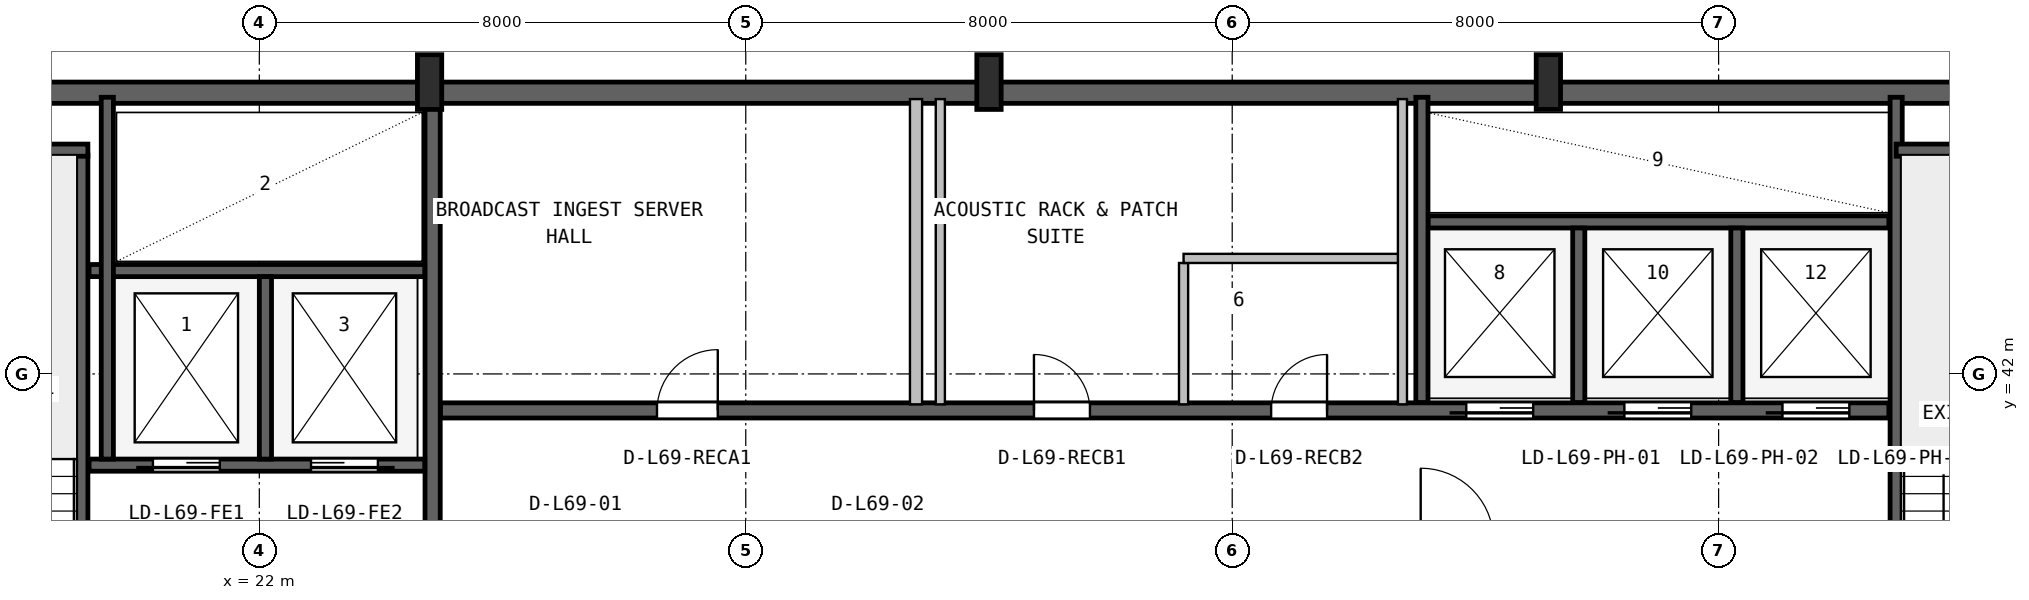
"""IFC4 building model, lengths in metres.
Left out: names, types, materials, properties, quantities, classifications, styles, units other than length and angle.
Written with IfcOpenShell. Run it as: python <this file> out.ifc"""

import sys

from ifc_helpers import new_model, si_unit, direction, frame, frame_2d, origin, origin_2d, place, context, subcontext, project, spatial, rectangle, i_section, extrude, source, transform, mapped, element, fill, save


model = new_model("IFC4")
c1 = context("Model", 3, precision=1e-05, world=origin(), true_north=direction((0.0, 1.0)))
c2 = subcontext(c1, "Body", "Model", "MODEL_VIEW")
j1 = project(units=[si_unit("LENGTHUNIT", "METRE"), si_unit("PLANEANGLEUNIT", "RADIAN")], contexts=[c1])
p1 = place(None, origin())
s1 = spatial("IfcSite", under=j1, at=p1, CompositionType="ELEMENT")
p2 = place(p1, origin())
s2 = spatial("IfcBuilding", under=s1, at=p2, CompositionType="ELEMENT")
p3 = place(p2, frame((0.0, 0.0, 277.4)))
s3 = spatial("IfcBuildingStorey", under=s2, at=p3, CompositionType="ELEMENT", Elevation=277.4)
p4 = place(p3, frame((15.325, 46.625, 0.0), z_axis=(0.0, 0.0, 1.0), x_axis=(1.0, 0.0, 0.0)))
e1 = element("IfcWall", 1, at=p4, inside=s3, PredefinedType="SHEAR", context=c2, shape_type="SweptSolid", body=[
    extrude(rectangle(XDim=37.35, YDim=0.35, at=frame_2d((18.675, 0.0))), origin(), (0.0, 0.0, 1.0), 3.55),
])
m1 = source(origin(), c2, "Body", "SweptSolid", [
    extrude(i_section(OverallWidth=0.4, OverallDepth=0.9, WebThickness=0.016, FlangeThickness=0.028, FilletRadius=0.016, at=origin_2d()), origin(), (0.0, 0.0, 1.0), 3.8),
])
for number, where, z_axis, x_axis in (
    (2, (24.8, 46.8, 0.0), (0.0, 0.0, 1.0), (1.0, 0.0, 0.0)),
    (3, (34.0, 46.8, 0.0), (0.0, 0.0, 1.0), (1.0, 0.0, 0.0)),
    (4, (43.2, 46.8, 0.0), (0.0, 0.0, 1.0), (1.0, 0.0, 0.0)),
):
    element("IfcColumn", number, at=place(p3, frame(where, z_axis=z_axis, x_axis=x_axis)), inside=s3, PredefinedType="COLUMN", context=c2, shape_type="MappedRepresentation", body=[
        mapped(m1, transform((0.0, 0.0, 0.0), x_axis=(1.0, 0.0, 0.0), y_axis=(0.0, 1.0, 0.0), z_axis=(0.0, 0.0, 1.0), scale=1.0)),
    ])
p5 = place(p3, frame((19.08, 35.95, 0.0), z_axis=(0.0, 0.0, 1.0), x_axis=(0.0, 1.0, 0.0)))
e5 = element("IfcWall", 5, at=p5, inside=s3, PredefinedType="SHEAR", context=c2, shape_type="SweptSolid", body=[
    extrude(rectangle(XDim=9.65, YDim=0.2, at=frame_2d((4.825, 0.0))), origin(), (0.0, 0.0, 1.0), 3.55),
])
p6 = place(p5, frame((0.25, 0.0, 0.0)))
e6 = element("IfcOpeningElement", 6, at=p6, cuts=e5, PredefinedType="OPENING", context=c2, shape_type="SweptSolid", body=[
    extrude(rectangle(XDim=0.95, YDim=2.1, at=frame_2d((0.475, 1.05))), frame((0.0, 0.11, 0.0), z_axis=(0.0, -1.0, 0.0), x_axis=(1.0, 0.0, 0.0)), (0.0, 0.0, 1.0), 0.22),
])
p7 = place(p3, frame((15.95, 45.68, 0.0), z_axis=(0.0, 0.0, 1.0), x_axis=(1.0, 0.0, 0.0)))
e7 = element("IfcWall", 7, at=p7, inside=s3, PredefinedType="SHEAR", context=c2, shape_type="SweptSolid", body=[
    extrude(rectangle(XDim=3.23, YDim=0.2, at=frame_2d((1.615, 0.0))), origin(), (0.0, 0.0, 1.0), 3.55),
])
p8 = place(p3, frame((24.85, 36.05, 0.0), z_axis=(0.0, 0.0, 1.0), x_axis=(0.0, 1.0, 0.0)))
e8 = element("IfcWall", 8, at=p8, inside=s3, PredefinedType="SHEAR", context=c2, shape_type="SweptSolid", body=[
    extrude(rectangle(XDim=10.45, YDim=0.25, at=frame_2d((5.225, 0.0))), origin(), (0.0, 0.0, 1.0), 3.55),
])
p9 = place(p3, frame((19.2, 40.5, 0.0), z_axis=(0.0, 0.0, 1.0), x_axis=(1.0, 0.0, 0.0)))
e9 = element("IfcWall", 9, at=p9, inside=s3, PredefinedType="SHEAR", context=c2, shape_type="SweptSolid", body=[
    extrude(rectangle(XDim=5.52, YDim=0.2, at=frame_2d((2.76, 0.0))), origin(), (0.0, 0.0, 1.0), 3.55),
])
p10 = place(p9, frame((1.05, 0.0, 0.0)))
e10 = element("IfcOpeningElement", 10, at=p10, cuts=e9, PredefinedType="OPENING", context=c2, shape_type="SweptSolid", body=[
    extrude(rectangle(XDim=1.1, YDim=2.18, at=frame_2d((0.55, 1.09))), frame((0.0, 0.11, 0.0), z_axis=(0.0, -1.0, 0.0), x_axis=(1.0, 0.0, 0.0)), (0.0, 0.0, 1.0), 0.22),
])
p11 = place(p9, frame((3.65, 0.0, 0.0)))
e11 = element("IfcOpeningElement", 11, at=p11, cuts=e9, PredefinedType="OPENING", context=c2, shape_type="SweptSolid", body=[
    extrude(rectangle(XDim=1.1, YDim=2.18, at=frame_2d((0.55, 1.09))), frame((0.0, 0.11, 0.0), z_axis=(0.0, -1.0, 0.0), x_axis=(1.0, 0.0, 0.0)), (0.0, 0.0, 1.0), 0.22),
])
p12 = place(p3, frame((19.2, 43.7, 0.0), z_axis=(0.0, 0.0, 1.0), x_axis=(1.0, 0.0, 0.0)))
e12 = element("IfcWall", 12, at=p12, inside=s3, PredefinedType="SHEAR", context=c2, shape_type="SweptSolid", body=[
    extrude(rectangle(XDim=5.52, YDim=0.2, at=frame_2d((2.76, 0.0))), origin(), (0.0, 0.0, 1.0), 3.55),
])
p13 = place(p3, frame((22.1, 40.6, 0.0), z_axis=(0.0, 0.0, 1.0), x_axis=(0.0, 1.0, 0.0)))
e13 = element("IfcWall", 13, at=p13, inside=s3, PredefinedType="SHEAR", context=c2, shape_type="SweptSolid", body=[
    extrude(rectangle(XDim=3.0, YDim=0.2, at=frame_2d((1.5, 0.0))), origin(), (0.0, 0.0, 1.0), 3.55),
])
p14 = place(p3, frame((19.5, 40.6, 0.0), z_axis=(0.0, 0.0, 1.0), x_axis=(0.0, 1.0, 0.0)))
e14 = element("IfcWall", 14, at=p14, inside=s3, PredefinedType="SHEAR", context=c2, shape_type="SweptSolid", body=[
    extrude(rectangle(XDim=5.95, YDim=0.2, at=frame_2d((2.975, 0.0))), origin(), (0.0, 0.0, 1.0), 3.55),
])
p15 = place(p3, frame((48.92, 36.05, 0.0), z_axis=(0.0, 0.0, 1.0), x_axis=(0.0, 1.0, 0.0)))
e15 = element("IfcWall", 15, at=p15, inside=s3, PredefinedType="SHEAR", context=c2, shape_type="SweptSolid", body=[
    extrude(rectangle(XDim=10.5, YDim=0.2, at=frame_2d((5.25, 0.0))), origin(), (0.0, 0.0, 1.0), 3.55),
])
p16 = place(p3, frame((48.92, 45.68, 0.0), z_axis=(0.0, 0.0, 1.0), x_axis=(1.0, 0.0, 0.0)))
e16 = element("IfcWall", 16, at=p16, inside=s3, PredefinedType="SHEAR", context=c2, shape_type="SweptSolid", body=[
    extrude(rectangle(XDim=3.18, YDim=0.2, at=frame_2d((1.59, 0.0))), origin(), (0.0, 0.0, 1.0), 3.55),
])
p17 = place(p3, frame((24.98, 41.4, 0.0), z_axis=(0.0, 0.0, 1.0), x_axis=(1.0, 0.0, 0.0)))
e17 = element("IfcWall", 17, at=p17, inside=s3, PredefinedType="SHEAR", context=c2, shape_type="SweptSolid", body=[
    extrude(rectangle(XDim=23.82, YDim=0.25, at=frame_2d((11.91, 0.0))), origin(), (0.0, 0.0, 1.0), 3.55),
])
p18 = place(p17, frame((16.87, 0.0, 0.0)))
e18 = element("IfcOpeningElement", 18, at=p18, cuts=e17, PredefinedType="OPENING", context=c2, shape_type="SweptSolid", body=[
    extrude(rectangle(XDim=1.1, YDim=2.18, at=frame_2d((0.55, 1.09))), frame((0.0, 0.135, 0.0), z_axis=(0.0, -1.0, 0.0), x_axis=(1.0, 0.0, 0.0)), (0.0, 0.0, 1.0), 0.27),
])
p19 = place(p17, frame((19.47, 0.0, 0.0)))
e19 = element("IfcOpeningElement", 19, at=p19, cuts=e17, PredefinedType="OPENING", context=c2, shape_type="SweptSolid", body=[
    extrude(rectangle(XDim=1.1, YDim=2.18, at=frame_2d((0.55, 1.09))), frame((0.0, 0.135, 0.0), z_axis=(0.0, -1.0, 0.0), x_axis=(1.0, 0.0, 0.0)), (0.0, 0.0, 1.0), 0.27),
])
p20 = place(p17, frame((22.07, 0.0, 0.0)))
e20 = element("IfcOpeningElement", 20, at=p20, cuts=e17, PredefinedType="OPENING", context=c2, shape_type="SweptSolid", body=[
    extrude(rectangle(XDim=1.1, YDim=2.18, at=frame_2d((0.55, 1.09))), frame((0.0, 0.135, 0.0), z_axis=(0.0, -1.0, 0.0), x_axis=(1.0, 0.0, 0.0)), (0.0, 0.0, 1.0), 0.27),
])
p21 = place(p17, frame((3.56, 0.0, 0.0)))
e21 = element("IfcOpeningElement", 21, at=p21, cuts=e17, PredefinedType="OPENING", context=c2, shape_type="SweptSolid", body=[
    extrude(rectangle(XDim=1.0, YDim=2.08, at=frame_2d((0.5, 1.04))), frame((0.0, 0.135, 0.0), z_axis=(0.0, -1.0, 0.0), x_axis=(1.0, 0.0, 0.0)), (0.0, 0.0, 1.0), 0.27),
])
p22 = place(p17, frame((9.76, 0.0, 0.0)))
e22 = element("IfcOpeningElement", 22, at=p22, cuts=e17, PredefinedType="OPENING", context=c2, shape_type="SweptSolid", body=[
    extrude(rectangle(XDim=0.92, YDim=2.08, at=frame_2d((0.46, 1.04))), frame((0.0, 0.135, 0.0), z_axis=(0.0, -1.0, 0.0), x_axis=(1.0, 0.0, 0.0)), (0.0, 0.0, 1.0), 0.27),
])
p23 = place(p17, frame((13.66, 0.0, 0.0)))
e23 = element("IfcOpeningElement", 23, at=p23, cuts=e17, PredefinedType="OPENING", context=c2, shape_type="SweptSolid", body=[
    extrude(rectangle(XDim=0.92, YDim=2.08, at=frame_2d((0.46, 1.04))), frame((0.0, 0.135, 0.0), z_axis=(0.0, -1.0, 0.0), x_axis=(1.0, 0.0, 0.0)), (0.0, 0.0, 1.0), 0.27),
])
p24 = place(p3, frame((41.22, 44.5, 0.0), z_axis=(0.0, 0.0, 1.0), x_axis=(1.0, 0.0, 0.0)))
e24 = element("IfcWall", 24, at=p24, inside=s3, PredefinedType="SHEAR", context=c2, shape_type="SweptSolid", body=[
    extrude(rectangle(XDim=7.58, YDim=0.2, at=frame_2d((3.79, 0.0))), origin(), (0.0, 0.0, 1.0), 3.55),
])
p25 = place(p3, frame((41.12, 41.53, 0.0), z_axis=(0.0, 0.0, 1.0), x_axis=(0.0, 1.0, 0.0)))
e25 = element("IfcWall", 25, at=p25, inside=s3, PredefinedType="SHEAR", context=c2, shape_type="SweptSolid", body=[
    extrude(rectangle(XDim=5.02, YDim=0.2, at=frame_2d((2.51, 0.0))), origin(), (0.0, 0.0, 1.0), 3.55),
])
for number, where, z_axis, x_axis in (
    (26, (43.7, 41.53, 0.0), (0.0, 0.0, 1.0), (0.0, 1.0, 0.0)),
    (27, (46.3, 41.53, 0.0), (0.0, 0.0, 1.0), (0.0, 1.0, 0.0)),
):
    element("IfcWall", number, at=place(p3, frame(where, z_axis=z_axis, x_axis=x_axis)), inside=s3, PredefinedType="SHEAR", context=c2, shape_type="SweptSolid", body=[
        extrude(rectangle(XDim=2.87, YDim=0.2, at=frame_2d((1.435, 0.0))), origin(), (0.0, 0.0, 1.0), 3.55),
    ])
p26 = place(p3, frame((32.8, 41.5, 0.0), z_axis=(0.0, 0.0, 1.0), x_axis=(0.0, 1.0, 0.0)))
e28 = element("IfcWall", 28, at=p26, inside=s3, PredefinedType="SOLIDWALL", context=c2, shape_type="SweptSolid", body=[
    extrude(rectangle(XDim=5.02, YDim=0.2, at=frame_2d((2.51, 0.0))), origin(), (0.0, 0.0, 1.0), 3.53),
])
p27 = place(p3, frame((37.2, 41.5, 0.0), z_axis=(0.0, 0.0, 1.0), x_axis=(0.0, 1.0, 0.0)))
e29 = element("IfcWall", 29, at=p27, inside=s3, PredefinedType="PARTITIONING", context=c2, shape_type="SweptSolid", body=[
    extrude(rectangle(XDim=2.325, YDim=0.15, at=frame_2d((1.163, 0.0))), origin(), (0.0, 0.0, 1.0), 3.53),
])
p28 = place(p3, frame((37.2, 43.9, 0.0), z_axis=(0.0, 0.0, 1.0), x_axis=(1.0, 0.0, 0.0)))
e30 = element("IfcWall", 30, at=p28, inside=s3, PredefinedType="PARTITIONING", context=c2, shape_type="SweptSolid", body=[
    extrude(rectangle(XDim=3.6, YDim=0.15, at=frame_2d((1.8, 0.0))), origin(), (0.0, 0.0, 1.0), 3.53),
])
for number, where, z_axis, x_axis in (
    (31, (40.8, 41.5, 0.0), (0.0, 0.0, 1.0), (0.0, 1.0, 0.0)),
    (32, (33.2, 41.5, 0.0), (0.0, 0.0, 1.0), (0.0, 1.0, 0.0)),
):
    element("IfcWall", number, at=place(p3, frame(where, z_axis=z_axis, x_axis=x_axis)), inside=s3, PredefinedType="PARTITIONING", context=c2, shape_type="SweptSolid", body=[
        extrude(rectangle(XDim=5.02, YDim=0.15, at=frame_2d((2.51, 0.0))), origin(), (0.0, 0.0, 1.0), 3.53),
    ])
m2 = source(origin(), c2, "Body", "SweptSolid", [
    extrude(rectangle(XDim=1.1, YDim=2.18, at=frame_2d((0.55, 1.09))), frame((0.0, 0.025, 0.0), z_axis=(0.0, -1.0, 0.0), x_axis=(1.0, 0.0, 0.0)), (0.0, 0.0, 1.0), 0.05),
])
p29 = place(p10, frame((1.1, 0.0, 0.0), z_axis=(0.0, 0.0, 1.0), x_axis=(-1.0, 0.0, 0.0)))
e33 = element("IfcDoor", 33, at=p29, inside=s3, OperationType="SLIDING_TO_LEFT", PredefinedType="DOOR", context=c2, shape_type="MappedRepresentation", body=[
    mapped(m2, transform((0.0, 0.0, 0.0), x_axis=(1.0, 0.0, 0.0), y_axis=(0.0, 1.0, 0.0), z_axis=(0.0, 0.0, 1.0), scale=1.0)),
])
fill(e10, e33)
p30 = place(p11, frame((1.1, 0.0, 0.0), z_axis=(0.0, 0.0, 1.0), x_axis=(-1.0, 0.0, 0.0)))
e34 = element("IfcDoor", 34, at=p30, inside=s3, OperationType="SLIDING_TO_RIGHT", PredefinedType="DOOR", context=c2, shape_type="MappedRepresentation", body=[
    mapped(m2, transform((0.0, 0.0, 0.0), x_axis=(1.0, 0.0, 0.0), y_axis=(0.0, 1.0, 0.0), z_axis=(0.0, 0.0, 1.0), scale=1.0)),
])
fill(e11, e34)
p31 = place(p18, frame((1.1, 0.0, 0.0), z_axis=(0.0, 0.0, 1.0), x_axis=(-1.0, 0.0, 0.0)))
e35 = element("IfcDoor", 35, at=p31, inside=s3, OperationType="SLIDING_TO_LEFT", PredefinedType="DOOR", context=c2, shape_type="MappedRepresentation", body=[
    mapped(m2, transform((0.0, 0.0, 0.0), x_axis=(1.0, 0.0, 0.0), y_axis=(0.0, 1.0, 0.0), z_axis=(0.0, 0.0, 1.0), scale=1.0)),
])
fill(e18, e35)
p32 = place(p19, frame((1.1, 0.0, 0.0), z_axis=(0.0, 0.0, 1.0), x_axis=(-1.0, 0.0, 0.0)))
e36 = element("IfcDoor", 36, at=p32, inside=s3, OperationType="SLIDING_TO_LEFT", PredefinedType="DOOR", context=c2, shape_type="MappedRepresentation", body=[
    mapped(m2, transform((0.0, 0.0, 0.0), x_axis=(1.0, 0.0, 0.0), y_axis=(0.0, 1.0, 0.0), z_axis=(0.0, 0.0, 1.0), scale=1.0)),
])
fill(e19, e36)
p33 = place(p20, frame((1.1, 0.0, 0.0), z_axis=(0.0, 0.0, 1.0), x_axis=(-1.0, 0.0, 0.0)))
e37 = element("IfcDoor", 37, at=p33, inside=s3, OperationType="SLIDING_TO_LEFT", PredefinedType="DOOR", context=c2, shape_type="MappedRepresentation", body=[
    mapped(m2, transform((0.0, 0.0, 0.0), x_axis=(1.0, 0.0, 0.0), y_axis=(0.0, 1.0, 0.0), z_axis=(0.0, 0.0, 1.0), scale=1.0)),
])
fill(e20, e37)
m3 = source(origin(), c2, "Body", "SweptSolid", [
    extrude(rectangle(XDim=1.0, YDim=2.08, at=frame_2d((0.5, 1.04))), frame((0.0, 0.025, 0.0), z_axis=(0.0, -1.0, 0.0), x_axis=(1.0, 0.0, 0.0)), (0.0, 0.0, 1.0), 0.05),
])
p34 = place(p21, origin())
e38 = element("IfcDoor", 38, at=p34, inside=s3, OperationType="SINGLE_SWING_RIGHT", PredefinedType="DOOR", context=c2, shape_type="MappedRepresentation", body=[
    mapped(m3, transform((0.0, 0.0, 0.0), x_axis=(1.0, 0.0, 0.0), y_axis=(0.0, 1.0, 0.0), z_axis=(0.0, 0.0, 1.0), scale=1.0)),
])
fill(e21, e38)
m4 = source(origin(), c2, "Body", "SweptSolid", [
    extrude(rectangle(XDim=0.92, YDim=2.08, at=frame_2d((0.46, 1.04))), frame((0.0, 0.025, 0.0), z_axis=(0.0, -1.0, 0.0), x_axis=(1.0, 0.0, 0.0)), (0.0, 0.0, 1.0), 0.05),
])
p35 = place(p22, origin())
e39 = element("IfcDoor", 39, at=p35, inside=s3, OperationType="SINGLE_SWING_LEFT", PredefinedType="DOOR", context=c2, shape_type="MappedRepresentation", body=[
    mapped(m4, transform((0.0, 0.0, 0.0), x_axis=(1.0, 0.0, 0.0), y_axis=(0.0, 1.0, 0.0), z_axis=(0.0, 0.0, 1.0), scale=1.0)),
])
fill(e22, e39)
p36 = place(p23, origin())
e40 = element("IfcDoor", 40, at=p36, inside=s3, OperationType="SINGLE_SWING_RIGHT", PredefinedType="DOOR", context=c2, shape_type="MappedRepresentation", body=[
    mapped(m4, transform((0.0, 0.0, 0.0), x_axis=(1.0, 0.0, 0.0), y_axis=(0.0, 1.0, 0.0), z_axis=(0.0, 0.0, 1.0), scale=1.0)),
])
fill(e23, e40)
save(model, sys.argv[1])
